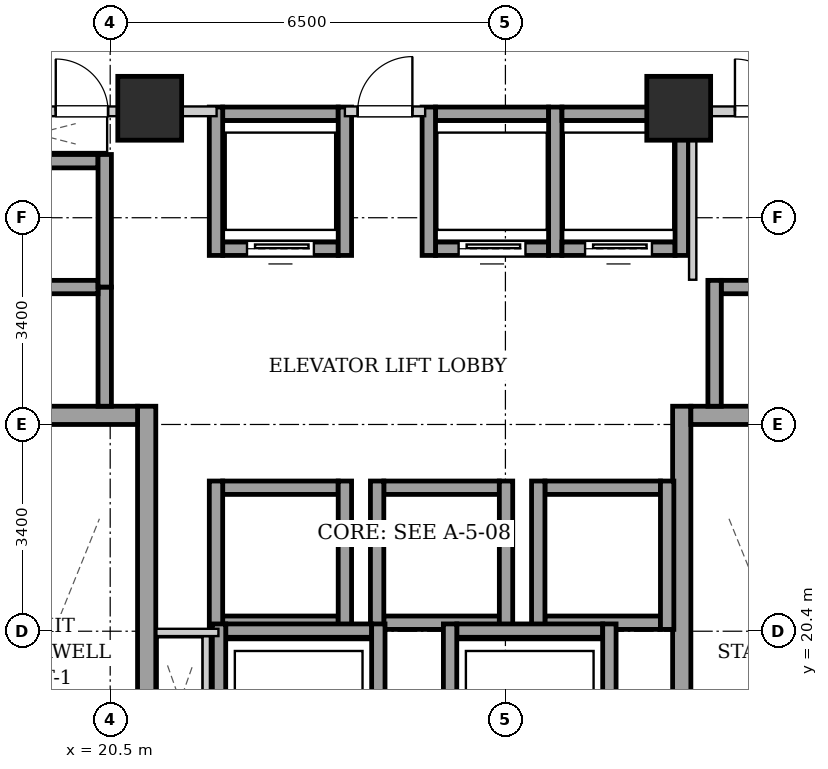
"""IFC4 building model, lengths in metres.
Left out: names, types, materials, properties, quantities, classifications, styles, units other than length and angle.
Written with IfcOpenShell. Run it as: python <this file> out.ifc"""

import sys

from ifc_helpers import new_model, si_unit, direction, frame, frame_2d, origin, origin_2d, place, context, subcontext, project, spatial, rectangle, extrude, element, fill, save


model = new_model("IFC4")
c1 = context("Model", 3, precision=1e-05, world=origin(), true_north=direction((0.0, 1.0)))
c2 = subcontext(c1, "Body", "Model", "MODEL_VIEW")
j1 = project(units=[si_unit("LENGTHUNIT", "METRE"), si_unit("PLANEANGLEUNIT", "RADIAN")], contexts=[c1])
p1 = place(None, origin())
s1 = spatial("IfcSite", under=j1, at=p1, CompositionType="ELEMENT")
p2 = place(p1, origin())
s2 = spatial("IfcBuilding", under=s1, at=p2, CompositionType="ELEMENT")
p3 = place(p2, frame((0.0, 0.0, 110.3)))
s3 = spatial("IfcBuildingStorey", under=s2, at=p3, CompositionType="ELEMENT", Elevation=110.3)
for number, where, z_axis, x_axis in (
    (1, (21.15, 29.0, 0.0), (0.0, 0.0, 1.0), (1.0, 0.0, 0.0)),
    (2, (29.85, 29.0, 0.0), (0.0, 0.0, 1.0), (1.0, 0.0, 0.0)),
):
    element("IfcColumn", number, at=place(p3, frame(where, z_axis=z_axis, x_axis=x_axis)), inside=s3, PredefinedType="COLUMN", context=c2, shape_type="SweptSolid", body=[
        extrude(rectangle(XDim=1.05, YDim=1.05, at=origin_2d()), origin(), (0.0, 0.0, 1.0), 3.2),
    ])
p4 = place(p3, frame((21.1, 15.1, 0.0), z_axis=(0.0, 0.0, 1.0), x_axis=(0.0, 1.0, 0.0)))
e3 = element("IfcWall", 3, at=p4, inside=s3, PredefinedType="SHEAR", context=c2, shape_type="SweptSolid", body=[
    extrude(rectangle(XDim=9.0, YDim=0.3, at=frame_2d((4.5, 0.0))), origin(), (0.0, 0.0, 1.0), 2.94),
])
p5 = place(p3, frame((18.1, 23.95, 0.0), z_axis=(0.0, 0.0, 1.0), x_axis=(1.0, 0.0, 0.0)))
e4 = element("IfcWall", 4, at=p5, inside=s3, PredefinedType="SHEAR", context=c2, shape_type="SweptSolid", body=[
    extrude(rectangle(XDim=2.85, YDim=0.3, at=frame_2d((1.425, 0.0))), origin(), (0.0, 0.0, 1.0), 2.94),
])
p6 = place(p3, frame((29.9, 15.1, 0.0), z_axis=(0.0, 0.0, 1.0), x_axis=(0.0, 1.0, 0.0)))
e5 = element("IfcWall", 5, at=p6, inside=s3, PredefinedType="SHEAR", context=c2, shape_type="SweptSolid", body=[
    extrude(rectangle(XDim=9.0, YDim=0.3, at=frame_2d((4.5, 0.0))), origin(), (0.0, 0.0, 1.0), 2.94),
])
p7 = place(p3, frame((30.05, 23.95, 0.0), z_axis=(0.0, 0.0, 1.0), x_axis=(1.0, 0.0, 0.0)))
e6 = element("IfcWall", 6, at=p7, inside=s3, PredefinedType="SHEAR", context=c2, shape_type="SweptSolid", body=[
    extrude(rectangle(XDim=2.85, YDim=0.3, at=frame_2d((1.425, 0.0))), origin(), (0.0, 0.0, 1.0), 2.94),
])
p8 = place(p3, frame((22.35, 26.69, 0.0), z_axis=(0.0, 0.0, 1.0), x_axis=(1.0, 0.0, 0.0)))
e7 = element("IfcWall", 7, at=p8, inside=s3, PredefinedType="SHEAR", context=c2, shape_type="SweptSolid", body=[
    extrude(rectangle(XDim=1.9, YDim=0.22, at=frame_2d((0.95, 0.0))), origin(), (0.0, 0.0, 1.0), 2.94),
])
p9 = place(p8, frame((0.4, 0.0, 0.0)))
e8 = element("IfcOpeningElement", 8, at=p9, cuts=e7, PredefinedType="OPENING", context=c2, shape_type="SweptSolid", body=[
    extrude(rectangle(XDim=1.1, YDim=2.15, at=frame_2d((0.55, 1.075))), frame((0.0, 0.12, 0.0), z_axis=(0.0, -1.0, 0.0), x_axis=(1.0, 0.0, 0.0)), (0.0, 0.0, 1.0), 0.24),
])
p10 = place(p3, frame((22.35, 28.91, 0.0), z_axis=(0.0, 0.0, 1.0), x_axis=(1.0, 0.0, 0.0)))
e9 = element("IfcWall", 9, at=p10, inside=s3, PredefinedType="SHEAR", context=c2, shape_type="SweptSolid", body=[
    extrude(rectangle(XDim=1.9, YDim=0.22, at=frame_2d((0.95, 0.0))), origin(), (0.0, 0.0, 1.0), 2.94),
])
for number, where, z_axis, x_axis in (
    (10, (22.24, 26.58, 0.0), (0.0, 0.0, 1.0), (0.0, 1.0, 0.0)),
    (11, (24.36, 26.58, 0.0), (0.0, 0.0, 1.0), (0.0, 1.0, 0.0)),
):
    element("IfcWall", number, at=place(p3, frame(where, z_axis=z_axis, x_axis=x_axis)), inside=s3, PredefinedType="SHEAR", context=c2, shape_type="SweptSolid", body=[
        extrude(rectangle(XDim=2.44, YDim=0.22, at=frame_2d((1.22, 0.0))), origin(), (0.0, 0.0, 1.0), 2.94),
    ])
p11 = place(p3, frame((25.85, 26.69, 0.0), z_axis=(0.0, 0.0, 1.0), x_axis=(1.0, 0.0, 0.0)))
e12 = element("IfcWall", 12, at=p11, inside=s3, PredefinedType="SHEAR", context=c2, shape_type="SweptSolid", body=[
    extrude(rectangle(XDim=1.86, YDim=0.22, at=frame_2d((0.93, 0.0))), origin(), (0.0, 0.0, 1.0), 2.94),
])
p12 = place(p11, frame((0.38, 0.0, 0.0)))
e13 = element("IfcOpeningElement", 13, at=p12, cuts=e12, PredefinedType="OPENING", context=c2, shape_type="SweptSolid", body=[
    extrude(rectangle(XDim=1.1, YDim=2.15, at=frame_2d((0.55, 1.075))), frame((0.0, 0.12, 0.0), z_axis=(0.0, -1.0, 0.0), x_axis=(1.0, 0.0, 0.0)), (0.0, 0.0, 1.0), 0.24),
])
p13 = place(p3, frame((25.85, 28.91, 0.0), z_axis=(0.0, 0.0, 1.0), x_axis=(1.0, 0.0, 0.0)))
e14 = element("IfcWall", 14, at=p13, inside=s3, PredefinedType="SHEAR", context=c2, shape_type="SweptSolid", body=[
    extrude(rectangle(XDim=1.86, YDim=0.22, at=frame_2d((0.93, 0.0))), origin(), (0.0, 0.0, 1.0), 2.94),
])
for number, where, z_axis, x_axis in (
    (15, (25.74, 26.58, 0.0), (0.0, 0.0, 1.0), (0.0, 1.0, 0.0)),
    (16, (27.82, 26.58, 0.0), (0.0, 0.0, 1.0), (0.0, 1.0, 0.0)),
):
    element("IfcWall", number, at=place(p3, frame(where, z_axis=z_axis, x_axis=x_axis)), inside=s3, PredefinedType="SHEAR", context=c2, shape_type="SweptSolid", body=[
        extrude(rectangle(XDim=2.44, YDim=0.22, at=frame_2d((1.22, 0.0))), origin(), (0.0, 0.0, 1.0), 2.94),
    ])
p14 = place(p3, frame((27.93, 26.69, 0.0), z_axis=(0.0, 0.0, 1.0), x_axis=(1.0, 0.0, 0.0)))
e17 = element("IfcWall", 17, at=p14, inside=s3, PredefinedType="SHEAR", context=c2, shape_type="SweptSolid", body=[
    extrude(rectangle(XDim=1.86, YDim=0.22, at=frame_2d((0.93, 0.0))), origin(), (0.0, 0.0, 1.0), 2.94),
])
p15 = place(p14, frame((0.38, 0.0, 0.0)))
e18 = element("IfcOpeningElement", 18, at=p15, cuts=e17, PredefinedType="OPENING", context=c2, shape_type="SweptSolid", body=[
    extrude(rectangle(XDim=1.1, YDim=2.15, at=frame_2d((0.55, 1.075))), frame((0.0, 0.12, 0.0), z_axis=(0.0, -1.0, 0.0), x_axis=(1.0, 0.0, 0.0)), (0.0, 0.0, 1.0), 0.24),
])
p16 = place(p3, frame((27.93, 28.91, 0.0), z_axis=(0.0, 0.0, 1.0), x_axis=(1.0, 0.0, 0.0)))
e19 = element("IfcWall", 19, at=p16, inside=s3, PredefinedType="SHEAR", context=c2, shape_type="SweptSolid", body=[
    extrude(rectangle(XDim=1.86, YDim=0.22, at=frame_2d((0.93, 0.0))), origin(), (0.0, 0.0, 1.0), 2.94),
])
p17 = place(p3, frame((29.9, 26.58, 0.0), z_axis=(0.0, 0.0, 1.0), x_axis=(0.0, 1.0, 0.0)))
e20 = element("IfcWall", 20, at=p17, inside=s3, PredefinedType="SHEAR", context=c2, shape_type="SweptSolid", body=[
    extrude(rectangle(XDim=2.44, YDim=0.22, at=frame_2d((1.22, 0.0))), origin(), (0.0, 0.0, 1.0), 2.94),
])
for number, where, z_axis, x_axis in (
    (21, (22.35, 20.54, 0.0), (0.0, 0.0, 1.0), (1.0, 0.0, 0.0)),
    (22, (22.35, 22.76, 0.0), (0.0, 0.0, 1.0), (1.0, 0.0, 0.0)),
):
    element("IfcWall", number, at=place(p3, frame(where, z_axis=z_axis, x_axis=x_axis)), inside=s3, PredefinedType="SHEAR", context=c2, shape_type="SweptSolid", body=[
        extrude(rectangle(XDim=1.9, YDim=0.22, at=frame_2d((0.95, 0.0))), origin(), (0.0, 0.0, 1.0), 2.94),
    ])
for number, where, z_axis, x_axis in (
    (23, (22.24, 20.43, 0.0), (0.0, 0.0, 1.0), (0.0, 1.0, 0.0)),
    (24, (24.36, 20.43, 0.0), (0.0, 0.0, 1.0), (0.0, 1.0, 0.0)),
):
    element("IfcWall", number, at=place(p3, frame(where, z_axis=z_axis, x_axis=x_axis)), inside=s3, PredefinedType="SHEAR", context=c2, shape_type="SweptSolid", body=[
        extrude(rectangle(XDim=2.44, YDim=0.22, at=frame_2d((1.22, 0.0))), origin(), (0.0, 0.0, 1.0), 2.94),
    ])
for number, where, z_axis, x_axis in (
    (25, (25.0, 20.54, 0.0), (0.0, 0.0, 1.0), (1.0, 0.0, 0.0)),
    (26, (25.0, 22.76, 0.0), (0.0, 0.0, 1.0), (1.0, 0.0, 0.0)),
):
    element("IfcWall", number, at=place(p3, frame(where, z_axis=z_axis, x_axis=x_axis)), inside=s3, PredefinedType="SHEAR", context=c2, shape_type="SweptSolid", body=[
        extrude(rectangle(XDim=1.9, YDim=0.22, at=frame_2d((0.95, 0.0))), origin(), (0.0, 0.0, 1.0), 2.94),
    ])
for number, where, z_axis, x_axis in (
    (27, (24.89, 20.43, 0.0), (0.0, 0.0, 1.0), (0.0, 1.0, 0.0)),
    (28, (27.01, 20.43, 0.0), (0.0, 0.0, 1.0), (0.0, 1.0, 0.0)),
):
    element("IfcWall", number, at=place(p3, frame(where, z_axis=z_axis, x_axis=x_axis)), inside=s3, PredefinedType="SHEAR", context=c2, shape_type="SweptSolid", body=[
        extrude(rectangle(XDim=2.44, YDim=0.22, at=frame_2d((1.22, 0.0))), origin(), (0.0, 0.0, 1.0), 2.94),
    ])
for number, where, z_axis, x_axis in (
    (29, (27.65, 20.54, 0.0), (0.0, 0.0, 1.0), (1.0, 0.0, 0.0)),
    (30, (27.65, 22.76, 0.0), (0.0, 0.0, 1.0), (1.0, 0.0, 0.0)),
):
    element("IfcWall", number, at=place(p3, frame(where, z_axis=z_axis, x_axis=x_axis)), inside=s3, PredefinedType="SHEAR", context=c2, shape_type="SweptSolid", body=[
        extrude(rectangle(XDim=1.9, YDim=0.22, at=frame_2d((0.95, 0.0))), origin(), (0.0, 0.0, 1.0), 2.94),
    ])
for number, where, z_axis, x_axis in (
    (31, (27.54, 20.43, 0.0), (0.0, 0.0, 1.0), (0.0, 1.0, 0.0)),
    (32, (29.66, 20.43, 0.0), (0.0, 0.0, 1.0), (0.0, 1.0, 0.0)),
):
    element("IfcWall", number, at=place(p3, frame(where, z_axis=z_axis, x_axis=x_axis)), inside=s3, PredefinedType="SHEAR", context=c2, shape_type="SweptSolid", body=[
        extrude(rectangle(XDim=2.44, YDim=0.22, at=frame_2d((1.22, 0.0))), origin(), (0.0, 0.0, 1.0), 2.94),
    ])
p18 = place(p3, frame((20.41, 24.1, 0.0), z_axis=(0.0, 0.0, 1.0), x_axis=(0.0, 1.0, 0.0)))
e33 = element("IfcWall", 33, at=p18, inside=s3, PredefinedType="SHEAR", context=c2, shape_type="SweptSolid", body=[
    extrude(rectangle(XDim=1.96, YDim=0.22, at=frame_2d((0.98, 0.0))), origin(), (0.0, 0.0, 1.0), 2.94),
])
for number, where, z_axis, x_axis in (
    (34, (18.4, 26.06, 0.0), (0.0, 0.0, 1.0), (1.0, 0.0, 0.0)),
    (35, (18.4, 28.13, 0.0), (0.0, 0.0, 1.0), (1.0, 0.0, 0.0)),
):
    element("IfcWall", number, at=place(p3, frame(where, z_axis=z_axis, x_axis=x_axis)), inside=s3, PredefinedType="SHEAR", context=c2, shape_type="SweptSolid", body=[
        extrude(rectangle(XDim=1.9, YDim=0.22, at=frame_2d((0.95, 0.0))), origin(), (0.0, 0.0, 1.0), 2.94),
    ])
p19 = place(p3, frame((20.41, 26.06, 0.0), z_axis=(0.0, 0.0, 1.0), x_axis=(0.0, 1.0, 0.0)))
e36 = element("IfcWall", 36, at=p19, inside=s3, PredefinedType="SHEAR", context=c2, shape_type="SweptSolid", body=[
    extrude(rectangle(XDim=2.18, YDim=0.22, at=frame_2d((1.09, 0.0))), origin(), (0.0, 0.0, 1.0), 2.94),
])
p20 = place(p3, frame((30.55, 26.06, 0.0), z_axis=(0.0, 0.0, 1.0), x_axis=(1.0, 0.0, 0.0)))
e37 = element("IfcWall", 37, at=p20, inside=s3, PredefinedType="SHEAR", context=c2, shape_type="SweptSolid", body=[
    extrude(rectangle(XDim=1.9, YDim=0.22, at=frame_2d((0.95, 0.0))), origin(), (0.0, 0.0, 1.0), 2.94),
])
p21 = place(p3, frame((30.44, 24.1, 0.0), z_axis=(0.0, 0.0, 1.0), x_axis=(0.0, 1.0, 0.0)))
e38 = element("IfcWall", 38, at=p21, inside=s3, PredefinedType="SHEAR", context=c2, shape_type="SweptSolid", body=[
    extrude(rectangle(XDim=2.07, YDim=0.22, at=frame_2d((1.035, 0.0))), origin(), (0.0, 0.0, 1.0), 2.94),
])
p22 = place(p3, frame((22.4, 20.41, 0.0), z_axis=(0.0, 0.0, 1.0), x_axis=(1.0, 0.0, 0.0)))
e39 = element("IfcWall", 39, at=p22, inside=s3, PredefinedType="SHEAR", context=c2, shape_type="SweptSolid", body=[
    extrude(rectangle(XDim=2.4, YDim=0.22, at=frame_2d((1.2, 0.0))), origin(), (0.0, 0.0, 1.0), 2.94),
])
for number, where, z_axis, x_axis in (
    (40, (22.29, 17.98, 0.0), (0.0, 0.0, 1.0), (0.0, 1.0, 0.0)),
    (41, (24.91, 17.98, 0.0), (0.0, 0.0, 1.0), (0.0, 1.0, 0.0)),
):
    element("IfcWall", number, at=place(p3, frame(where, z_axis=z_axis, x_axis=x_axis)), inside=s3, PredefinedType="SHEAR", context=c2, shape_type="SweptSolid", body=[
        extrude(rectangle(XDim=2.54, YDim=0.22, at=frame_2d((1.27, 0.0))), origin(), (0.0, 0.0, 1.0), 2.94),
    ])
p23 = place(p3, frame((26.2, 20.41, 0.0), z_axis=(0.0, 0.0, 1.0), x_axis=(1.0, 0.0, 0.0)))
e42 = element("IfcWall", 42, at=p23, inside=s3, PredefinedType="SHEAR", context=c2, shape_type="SweptSolid", body=[
    extrude(rectangle(XDim=2.4, YDim=0.22, at=frame_2d((1.2, 0.0))), origin(), (0.0, 0.0, 1.0), 2.94),
])
for number, where, z_axis, x_axis in (
    (43, (26.09, 17.98, 0.0), (0.0, 0.0, 1.0), (0.0, 1.0, 0.0)),
    (44, (28.71, 17.98, 0.0), (0.0, 0.0, 1.0), (0.0, 1.0, 0.0)),
):
    element("IfcWall", number, at=place(p3, frame(where, z_axis=z_axis, x_axis=x_axis)), inside=s3, PredefinedType="SHEAR", context=c2, shape_type="SweptSolid", body=[
        extrude(rectangle(XDim=2.54, YDim=0.22, at=frame_2d((1.27, 0.0))), origin(), (0.0, 0.0, 1.0), 2.94),
    ])
p24 = place(p3, frame((24.36, 28.95, 0.0), z_axis=(0.0, 0.0, 1.0), x_axis=(1.0, 0.0, 0.0)))
e45 = element("IfcWall", 45, at=p24, inside=s3, PredefinedType="PARTITIONING", context=c2, shape_type="SweptSolid", body=[
    extrude(rectangle(XDim=1.32, YDim=0.16, at=frame_2d((0.66, 0.0))), origin(), (0.0, 0.0, 1.0), 2.313),
])
p25 = place(p24, frame((0.21, 0.0, 0.0)))
e46 = element("IfcOpeningElement", 46, at=p25, cuts=e45, PredefinedType="OPENING", context=c2, shape_type="SweptSolid", body=[
    extrude(rectangle(XDim=0.9, YDim=2.05, at=frame_2d((0.45, 1.025))), frame((0.0, 0.09, 0.0), z_axis=(0.0, -1.0, 0.0), x_axis=(1.0, 0.0, 0.0)), (0.0, 0.0, 1.0), 0.18),
])
p26 = place(p3, frame((17.96, 28.95, 0.0), z_axis=(0.0, 0.0, 1.0), x_axis=(1.0, 0.0, 0.0)))
e47 = element("IfcWall", 47, at=p26, inside=s3, PredefinedType="PARTITIONING", context=c2, shape_type="SweptSolid", body=[
    extrude(rectangle(XDim=4.29, YDim=0.16, at=frame_2d((2.145, 0.0))), origin(), (0.0, 0.0, 1.0), 2.313),
])
p27 = place(p26, frame((1.645, 0.0, 0.0)))
e48 = element("IfcOpeningElement", 48, at=p27, cuts=e47, PredefinedType="OPENING", context=c2, shape_type="SweptSolid", body=[
    extrude(rectangle(XDim=0.86, YDim=2.05, at=frame_2d((0.43, 1.025))), frame((0.0, 0.09, 0.0), z_axis=(0.0, -1.0, 0.0), x_axis=(1.0, 0.0, 0.0)), (0.0, 0.0, 1.0), 0.18),
])
p28 = place(p3, frame((22.08, 18.2, 0.0), z_axis=(0.0, 0.0, 1.0), x_axis=(0.0, 1.0, 0.0)))
e49 = element("IfcWall", 49, at=p28, inside=s3, PredefinedType="PARTITIONING", context=c2, shape_type="SweptSolid", body=[
    extrude(rectangle(XDim=2.12, YDim=0.12, at=frame_2d((1.06, 0.0))), origin(), (0.0, 0.0, 1.0), 2.94),
])
p29 = place(p3, frame((22.28, 20.38, 0.0), z_axis=(0.0, 0.0, 1.0), x_axis=(-1.0, 0.0, 0.0)))
e50 = element("IfcWall", 50, at=p29, inside=s3, PredefinedType="PARTITIONING", context=c2, shape_type="SweptSolid", body=[
    extrude(rectangle(XDim=1.02, YDim=0.12, at=frame_2d((0.51, 0.0))), origin(), (0.0, 0.0, 1.0), 2.94),
])
p30 = place(p3, frame((30.08, 26.18, 0.0), z_axis=(0.0, 0.0, 1.0), x_axis=(0.0, 1.0, 0.0)))
e51 = element("IfcWall", 51, at=p30, inside=s3, PredefinedType="PARTITIONING", context=c2, shape_type="SweptSolid", body=[
    extrude(rectangle(XDim=2.68, YDim=0.12, at=frame_2d((1.34, 0.0))), origin(), (0.0, 0.0, 1.0), 2.94),
])
p31 = place(p3, frame((30.08, 28.95, 0.0), z_axis=(0.0, 0.0, 1.0), x_axis=(1.0, 0.0, 0.0)))
e52 = element("IfcWall", 52, at=p31, inside=s3, PredefinedType="PARTITIONING", context=c2, shape_type="SweptSolid", body=[
    extrude(rectangle(XDim=2.96, YDim=0.16, at=frame_2d((1.48, 0.0))), origin(), (0.0, 0.0, 1.0), 2.94),
])
p32 = place(p31, frame((0.695, 0.0, 0.0)))
e53 = element("IfcOpeningElement", 53, at=p32, cuts=e52, PredefinedType="OPENING", context=c2, shape_type="SweptSolid", body=[
    extrude(rectangle(XDim=0.86, YDim=2.05, at=frame_2d((0.43, 1.025))), frame((0.0, 0.09, 0.0), z_axis=(0.0, -1.0, 0.0), x_axis=(1.0, 0.0, 0.0)), (0.0, 0.0, 1.0), 0.18),
])
p33 = place(p9, origin())
e54 = element("IfcDoor", 54, at=p33, inside=s3, OperationType="SLIDING_TO_LEFT", PredefinedType="DOOR", context=c2, shape_type="SweptSolid", body=[
    extrude(rectangle(XDim=1.1, YDim=2.15, at=frame_2d((0.55, 1.075))), frame((0.0, 0.025, 0.0), z_axis=(0.0, -1.0, 0.0), x_axis=(1.0, 0.0, 0.0)), (0.0, 0.0, 1.0), 0.05),
])
fill(e8, e54)
p34 = place(p12, origin())
e55 = element("IfcDoor", 55, at=p34, inside=s3, OperationType="SLIDING_TO_LEFT", PredefinedType="DOOR", context=c2, shape_type="SweptSolid", body=[
    extrude(rectangle(XDim=1.1, YDim=2.15, at=frame_2d((0.55, 1.075))), frame((0.0, 0.025, 0.0), z_axis=(0.0, -1.0, 0.0), x_axis=(1.0, 0.0, 0.0)), (0.0, 0.0, 1.0), 0.05),
])
fill(e13, e55)
p35 = place(p15, origin())
e56 = element("IfcDoor", 56, at=p35, inside=s3, OperationType="SLIDING_TO_LEFT", PredefinedType="DOOR", context=c2, shape_type="SweptSolid", body=[
    extrude(rectangle(XDim=1.1, YDim=2.15, at=frame_2d((0.55, 1.075))), frame((0.0, 0.025, 0.0), z_axis=(0.0, -1.0, 0.0), x_axis=(1.0, 0.0, 0.0)), (0.0, 0.0, 1.0), 0.05),
])
fill(e18, e56)
p36 = place(p25, origin())
e57 = element("IfcDoor", 57, at=p36, inside=s3, OperationType="SINGLE_SWING_RIGHT", PredefinedType="DOOR", context=c2, shape_type="SweptSolid", body=[
    extrude(rectangle(XDim=0.9, YDim=2.05, at=frame_2d((0.45, 1.025))), frame((0.0, 0.025, 0.0), z_axis=(0.0, -1.0, 0.0), x_axis=(1.0, 0.0, 0.0)), (0.0, 0.0, 1.0), 0.05),
])
fill(e46, e57)
p37 = place(p27, origin())
e58 = element("IfcDoor", 58, at=p37, inside=s3, OperationType="SINGLE_SWING_LEFT", PredefinedType="DOOR", context=c2, shape_type="SweptSolid", body=[
    extrude(rectangle(XDim=0.86, YDim=2.05, at=frame_2d((0.43, 1.025))), frame((0.0, 0.025, 0.0), z_axis=(0.0, -1.0, 0.0), x_axis=(1.0, 0.0, 0.0)), (0.0, 0.0, 1.0), 0.05),
])
fill(e48, e58)
p38 = place(p32, origin())
e59 = element("IfcDoor", 59, at=p38, inside=s3, OperationType="SINGLE_SWING_LEFT", PredefinedType="DOOR", context=c2, shape_type="SweptSolid", body=[
    extrude(rectangle(XDim=0.86, YDim=2.05, at=frame_2d((0.43, 1.025))), frame((0.0, 0.025, 0.0), z_axis=(0.0, -1.0, 0.0), x_axis=(1.0, 0.0, 0.0)), (0.0, 0.0, 1.0), 0.05),
])
fill(e53, e59)
save(model, sys.argv[1])
